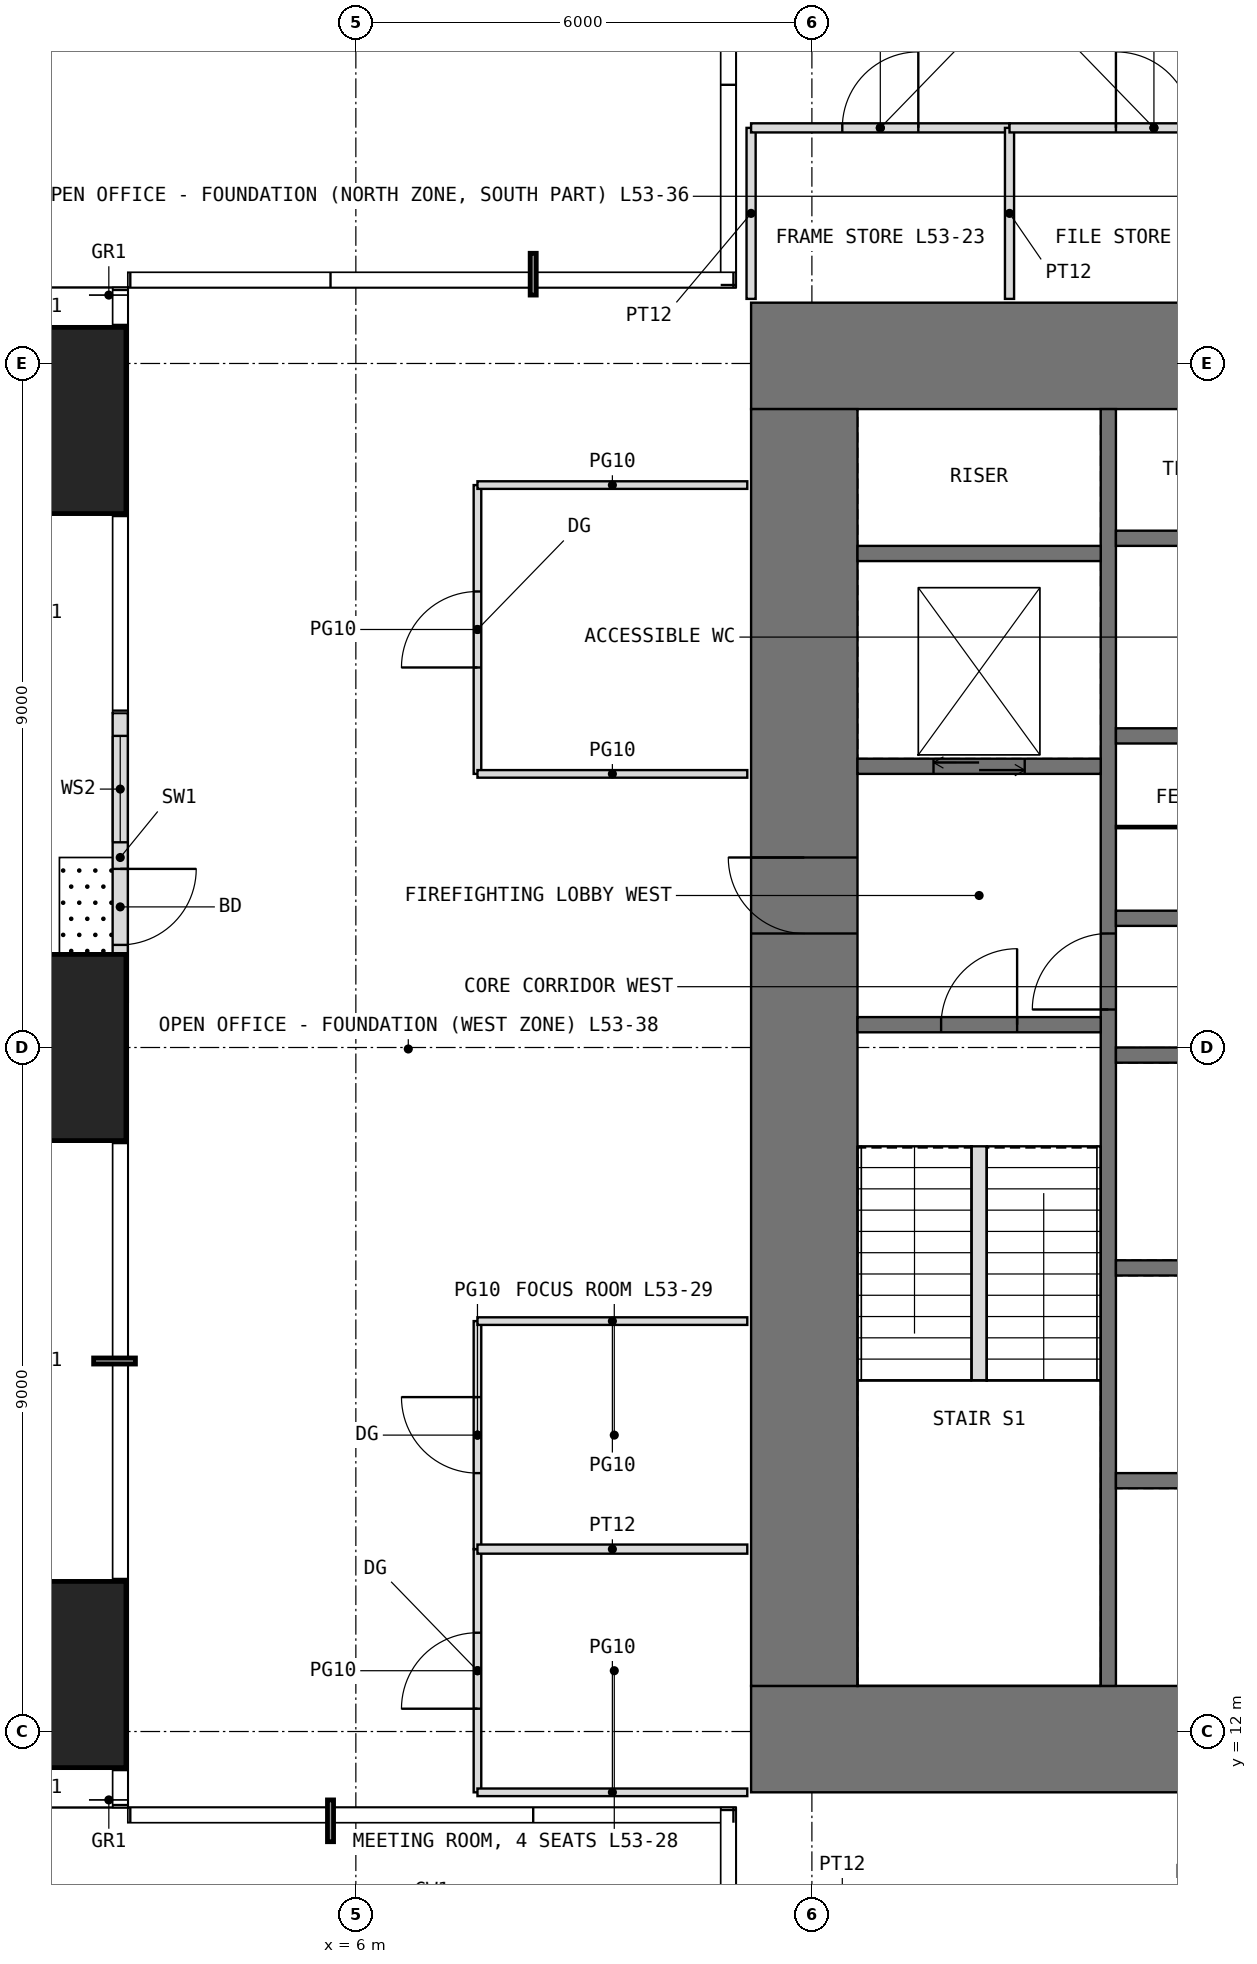
"""IFC4 building model, lengths in metres.
Left out: names, types, materials, properties, quantities, classifications, styles, units other than length and angle.
Written with IfcOpenShell. Run it as: python <this file> out.ifc"""

import sys

from ifc_helpers import new_model, si_unit, direction, frame, frame_2d, origin, origin_2d, place, context, subcontext, project, spatial, rectangle, extrude, element, fill, save


model = new_model("IFC4")
c1 = context("Model", 3, precision=1e-05, world=origin(), true_north=direction((0.0, 1.0)))
c2 = subcontext(c1, "Body", "Model", "MODEL_VIEW")
j1 = project(units=[si_unit("LENGTHUNIT", "METRE"), si_unit("PLANEANGLEUNIT", "RADIAN")], contexts=[c1])
p1 = place(None, origin())
s1 = spatial("IfcSite", under=j1, at=p1, CompositionType="ELEMENT")
p2 = place(p1, origin())
s2 = spatial("IfcBuilding", under=s1, at=p2, CompositionType="ELEMENT")
p3 = place(p2, frame((0.0, 0.0, 222.5)))
s3 = spatial("IfcBuildingStorey", under=s2, at=p3, CompositionType="ELEMENT", Elevation=222.5)
for number, where, z_axis, x_axis in (
    (1, (1.75, 12.75, 0.0), (0.0, 0.0, 1.0), (1.0, 0.0, 0.0)),
    (2, (1.75, 21.0, 0.0), (0.0, 0.0, 1.0), (1.0, 0.0, 0.0)),
    (3, (1.75, 29.25, 0.0), (0.0, 0.0, 1.0), (1.0, 0.0, 0.0)),
):
    element("IfcColumn", number, at=place(p3, frame(where, z_axis=z_axis, x_axis=x_axis)), inside=s3, PredefinedType="COLUMN", context=c2, shape_type="SweptSolid", body=[
        extrude(rectangle(XDim=2.45, YDim=2.45, at=origin_2d()), origin(), (0.0, 0.0, 1.0), 4.0),
    ])
p4 = place(p3, frame((2.9, 25.4, 0.0), z_axis=(0.0, 0.0, 1.0), x_axis=(0.0, -1.0, 0.0)))
e4 = element("IfcWall", 4, at=p4, inside=s3, PredefinedType="USERDEFINED", context=c2, shape_type="SweptSolid", body=[
    extrude(rectangle(XDim=3.8, YDim=0.2, at=frame_2d((1.9, 0.0))), origin(), (0.0, 0.0, 1.0), 3.75),
])
p5 = place(p4, frame((2.05, 0.0, 0.0)))
e5 = element("IfcOpeningElement", 5, at=p5, cuts=e4, PredefinedType="OPENING", context=c2, shape_type="SweptSolid", body=[
    extrude(rectangle(XDim=1.0, YDim=2.4, at=frame_2d((0.5, 1.2))), frame((0.0, 0.11, 0.0), z_axis=(0.0, -1.0, 0.0), x_axis=(1.0, 0.0, 0.0)), (0.0, 0.0, 1.0), 0.22),
])
p6 = place(p4, frame((0.3, 0.0, 0.3)))
e6 = element("IfcOpeningElement", 6, at=p6, cuts=e4, PredefinedType="OPENING", context=c2, shape_type="SweptSolid", body=[
    extrude(rectangle(XDim=1.4, YDim=2.7, at=frame_2d((0.7, 1.35))), frame((0.0, 0.11, 0.0), z_axis=(0.0, -1.0, 0.0), x_axis=(1.0, 0.0, 0.0)), (0.0, 0.0, 1.0), 0.22),
])
p7 = place(p3, frame((11.2, 11.9, -0.05), z_axis=(0.0, 0.0, 1.0), x_axis=(1.0, 0.0, 0.0)))
e7 = element("IfcWall", 7, at=p7, inside=s3, PredefinedType="SHEAR", context=c2, shape_type="SweptSolid", body=[
    extrude(rectangle(XDim=19.6, YDim=1.4, at=frame_2d((9.8, 0.0))), origin(), (0.0, 0.0, 1.0), 4.0),
])
p8 = place(p7, frame((8.8, 0.0, 0.05)))
e8 = element("IfcOpeningElement", 8, at=p8, cuts=e7, PredefinedType="OPENING", context=c2, shape_type="SweptSolid", body=[
    extrude(rectangle(XDim=2.0, YDim=2.2, at=frame_2d((1.0, 1.1))), frame((0.0, 0.71, 0.0), z_axis=(0.0, -1.0, 0.0), x_axis=(1.0, 0.0, 0.0)), (0.0, 0.0, 1.0), 1.42),
])
p9 = place(p3, frame((11.2, 30.1, -0.05), z_axis=(0.0, 0.0, 1.0), x_axis=(1.0, 0.0, 0.0)))
e9 = element("IfcWall", 9, at=p9, inside=s3, PredefinedType="SHEAR", context=c2, shape_type="SweptSolid", body=[
    extrude(rectangle(XDim=19.6, YDim=1.4, at=frame_2d((9.8, 0.0))), origin(), (0.0, 0.0, 1.0), 4.0),
])
p10 = place(p9, frame((8.8, 0.0, 0.05)))
e10 = element("IfcOpeningElement", 10, at=p10, cuts=e9, PredefinedType="OPENING", context=c2, shape_type="SweptSolid", body=[
    extrude(rectangle(XDim=2.0, YDim=2.2, at=frame_2d((1.0, 1.1))), frame((0.0, 0.71, 0.0), z_axis=(0.0, -1.0, 0.0), x_axis=(1.0, 0.0, 0.0)), (0.0, 0.0, 1.0), 1.42),
])
p11 = place(p3, frame((11.9, 12.6, -0.05), z_axis=(0.0, 0.0, 1.0), x_axis=(0.0, 1.0, 0.0)))
e11 = element("IfcWall", 11, at=p11, inside=s3, PredefinedType="SHEAR", context=c2, shape_type="SweptSolid", body=[
    extrude(rectangle(XDim=16.8, YDim=1.4, at=frame_2d((8.4, 0.0))), origin(), (0.0, 0.0, 1.0), 4.0),
])
p12 = place(p11, frame((9.9, 0.0, 0.05)))
e12 = element("IfcOpeningElement", 12, at=p12, cuts=e11, PredefinedType="OPENING", context=c2, shape_type="SweptSolid", body=[
    extrude(rectangle(XDim=1.0, YDim=2.2, at=frame_2d((0.5, 1.1))), frame((0.0, 0.71, 0.0), z_axis=(0.0, -1.0, 0.0), x_axis=(1.0, 0.0, 0.0)), (0.0, 0.0, 1.0), 1.42),
])
p13 = place(p3, frame((15.9, 12.6, -0.05), z_axis=(0.0, 0.0, 1.0), x_axis=(0.0, 1.0, 0.0)))
e13 = element("IfcWall", 13, at=p13, inside=s3, PredefinedType="SHEAR", context=c2, shape_type="SweptSolid", body=[
    extrude(rectangle(XDim=16.8, YDim=0.2, at=frame_2d((8.4, 0.0))), origin(), (0.0, 0.0, 1.0), 4.0),
])
p14 = place(p13, frame((8.9, 0.0, 0.05)))
e14 = element("IfcOpeningElement", 14, at=p14, cuts=e13, PredefinedType="OPENING", context=c2, shape_type="SweptSolid", body=[
    extrude(rectangle(XDim=1.0, YDim=2.2, at=frame_2d((0.5, 1.1))), frame((0.0, 0.11, 0.0), z_axis=(0.0, -1.0, 0.0), x_axis=(1.0, 0.0, 0.0)), (0.0, 0.0, 1.0), 0.22),
])
p15 = place(p3, frame((12.6, 21.3, -0.05), z_axis=(0.0, 0.0, 1.0), x_axis=(1.0, 0.0, 0.0)))
e15 = element("IfcWall", 15, at=p15, inside=s3, PredefinedType="SHEAR", context=c2, shape_type="SweptSolid", body=[
    extrude(rectangle(XDim=3.2, YDim=0.2, at=frame_2d((1.6, 0.0))), origin(), (0.0, 0.0, 1.0), 4.0),
])
p16 = place(p15, frame((1.1, 0.0, 0.05)))
e16 = element("IfcOpeningElement", 16, at=p16, cuts=e15, PredefinedType="OPENING", context=c2, shape_type="SweptSolid", body=[
    extrude(rectangle(XDim=1.0, YDim=2.2, at=frame_2d((0.5, 1.1))), frame((0.0, 0.11, 0.0), z_axis=(0.0, -1.0, 0.0), x_axis=(1.0, 0.0, 0.0)), (0.0, 0.0, 1.0), 0.22),
])
p17 = place(p3, frame((12.6, 24.7, -0.05), z_axis=(0.0, 0.0, 1.0), x_axis=(1.0, 0.0, 0.0)))
e17 = element("IfcWall", 17, at=p17, inside=s3, PredefinedType="SHEAR", context=c2, shape_type="SweptSolid", body=[
    extrude(rectangle(XDim=3.2, YDim=0.2, at=frame_2d((1.6, 0.0))), origin(), (0.0, 0.0, 1.0), 4.0),
])
p18 = place(p17, frame((1.0, 0.0, 0.05)))
e18 = element("IfcOpeningElement", 18, at=p18, cuts=e17, PredefinedType="OPENING", context=c2, shape_type="SweptSolid", body=[
    extrude(rectangle(XDim=1.2, YDim=2.2, at=frame_2d((0.6, 1.1))), frame((0.0, 0.11, 0.0), z_axis=(0.0, -1.0, 0.0), x_axis=(1.0, 0.0, 0.0)), (0.0, 0.0, 1.0), 0.22),
])
for number, where, z_axis, x_axis in (
    (19, (12.6, 27.5, -0.05), (0.0, 0.0, 1.0), (1.0, 0.0, 0.0)),
    (20, (16.0, 15.3, -0.05), (0.0, 0.0, 1.0), (1.0, 0.0, 0.0)),
    (21, (16.0, 18.1, -0.05), (0.0, 0.0, 1.0), (1.0, 0.0, 0.0)),
    (22, (16.0, 20.9, -0.05), (0.0, 0.0, 1.0), (1.0, 0.0, 0.0)),
    (23, (16.0, 22.7, -0.05), (0.0, 0.0, 1.0), (1.0, 0.0, 0.0)),
    (24, (16.0, 25.1, -0.05), (0.0, 0.0, 1.0), (1.0, 0.0, 0.0)),
    (25, (16.0, 27.7, -0.05), (0.0, 0.0, 1.0), (1.0, 0.0, 0.0)),
):
    element("IfcWall", number, at=place(p3, frame(where, z_axis=z_axis, x_axis=x_axis)), inside=s3, PredefinedType="SHEAR", context=c2, shape_type="SweptSolid", body=[
        extrude(rectangle(XDim=3.2, YDim=0.2, at=frame_2d((1.6, 0.0))), origin(), (0.0, 0.0, 1.0), 4.0),
    ])
p19 = place(p3, frame((16.0, 23.9, 0.0), z_axis=(0.0, 0.0, 1.0), x_axis=(1.0, 0.0, 0.0)))
e26 = element("IfcWall", 26, at=p19, inside=s3, PredefinedType="PARTITIONING", context=c2, shape_type="SweptSolid", body=[
    extrude(rectangle(XDim=1.4, YDim=0.03, at=frame_2d((0.7, 0.0))), origin(), (0.0, 0.0, 1.0), 3.75),
])
p20 = place(p3, frame((7.6, 11.2, 0.0), z_axis=(0.0, 0.0, 1.0), x_axis=(0.0, 1.0, 0.0)))
e27 = element("IfcWall", 27, at=p20, inside=s3, PredefinedType="PARTITIONING", context=c2, shape_type="SweptSolid", body=[
    extrude(rectangle(XDim=3.2, YDim=0.1, at=frame_2d((1.6, 0.0))), origin(), (0.0, 0.0, 1.0), 3.75),
])
p21 = place(p20, frame((1.1, 0.0, 0.0)))
e28 = element("IfcOpeningElement", 28, at=p21, cuts=e27, PredefinedType="OPENING", context=c2, shape_type="SweptSolid", body=[
    extrude(rectangle(XDim=1.0, YDim=2.4, at=frame_2d((0.5, 1.2))), frame((0.0, 0.06, 0.0), z_axis=(0.0, -1.0, 0.0), x_axis=(1.0, 0.0, 0.0)), (0.0, 0.0, 1.0), 0.12),
])
p22 = place(p3, frame((7.6, 11.2, 0.0), z_axis=(0.0, 0.0, 1.0), x_axis=(1.0, 0.0, 0.0)))
e29 = element("IfcWall", 29, at=p22, inside=s3, PredefinedType="PARTITIONING", context=c2, shape_type="SweptSolid", body=[
    extrude(rectangle(XDim=3.55, YDim=0.1, at=frame_2d((1.775, 0.0))), origin(), (0.0, 0.0, 1.0), 3.75),
])
p23 = place(p3, frame((7.6, 14.4, 0.0), z_axis=(0.0, 0.0, 1.0), x_axis=(0.0, 1.0, 0.0)))
e30 = element("IfcWall", 30, at=p23, inside=s3, PredefinedType="PARTITIONING", context=c2, shape_type="SweptSolid", body=[
    extrude(rectangle(XDim=3.0, YDim=0.1, at=frame_2d((1.5, 0.0))), origin(), (0.0, 0.0, 1.0), 3.75),
])
p24 = place(p23, frame((1.0, 0.0, 0.0)))
e31 = element("IfcOpeningElement", 31, at=p24, cuts=e30, PredefinedType="OPENING", context=c2, shape_type="SweptSolid", body=[
    extrude(rectangle(XDim=1.0, YDim=2.4, at=frame_2d((0.5, 1.2))), frame((0.0, 0.06, 0.0), z_axis=(0.0, -1.0, 0.0), x_axis=(1.0, 0.0, 0.0)), (0.0, 0.0, 1.0), 0.12),
])
p25 = place(p3, frame((7.6, 14.4, 0.0), z_axis=(0.0, 0.0, 1.0), x_axis=(1.0, 0.0, 0.0)))
e32 = element("IfcWall", 32, at=p25, inside=s3, PredefinedType="PARTITIONING", context=c2, shape_type="SweptSolid", body=[
    extrude(rectangle(XDim=3.55, YDim=0.12, at=frame_2d((1.775, 0.0))), origin(), (0.0, 0.0, 1.0), 3.75),
])
p26 = place(p3, frame((7.6, 17.4, 0.0), z_axis=(0.0, 0.0, 1.0), x_axis=(1.0, 0.0, 0.0)))
e33 = element("IfcWall", 33, at=p26, inside=s3, PredefinedType="PARTITIONING", context=c2, shape_type="SweptSolid", body=[
    extrude(rectangle(XDim=3.55, YDim=0.1, at=frame_2d((1.775, 0.0))), origin(), (0.0, 0.0, 1.0), 3.75),
])
p27 = place(p3, frame((7.6, 24.6, 0.0), z_axis=(0.0, 0.0, 1.0), x_axis=(0.0, 1.0, 0.0)))
e34 = element("IfcWall", 34, at=p27, inside=s3, PredefinedType="PARTITIONING", context=c2, shape_type="SweptSolid", body=[
    extrude(rectangle(XDim=3.8, YDim=0.1, at=frame_2d((1.9, 0.0))), origin(), (0.0, 0.0, 1.0), 3.75),
])
p28 = place(p27, frame((1.4, 0.0, 0.0)))
e35 = element("IfcOpeningElement", 35, at=p28, cuts=e34, PredefinedType="OPENING", context=c2, shape_type="SweptSolid", body=[
    extrude(rectangle(XDim=1.0, YDim=2.4, at=frame_2d((0.5, 1.2))), frame((0.0, 0.06, 0.0), z_axis=(0.0, -1.0, 0.0), x_axis=(1.0, 0.0, 0.0)), (0.0, 0.0, 1.0), 0.12),
])
for number, where, z_axis, x_axis in (
    (36, (7.6, 24.6, 0.0), (0.0, 0.0, 1.0), (1.0, 0.0, 0.0)),
    (37, (7.6, 28.4, 0.0), (0.0, 0.0, 1.0), (1.0, 0.0, 0.0)),
):
    element("IfcWall", number, at=place(p3, frame(where, z_axis=z_axis, x_axis=x_axis)), inside=s3, PredefinedType="PARTITIONING", context=c2, shape_type="SweptSolid", body=[
        extrude(rectangle(XDim=3.55, YDim=0.1, at=frame_2d((1.775, 0.0))), origin(), (0.0, 0.0, 1.0), 3.75),
    ])
p29 = place(p3, frame((11.2, 30.85, 0.0), z_axis=(0.0, 0.0, 1.0), x_axis=(0.0, 1.0, 0.0)))
e38 = element("IfcWall", 38, at=p29, inside=s3, PredefinedType="PARTITIONING", context=c2, shape_type="SweptSolid", body=[
    extrude(rectangle(XDim=2.25, YDim=0.12, at=frame_2d((1.125, 0.0))), origin(), (0.0, 0.0, 1.0), 3.75),
])
p30 = place(p3, frame((11.2, 33.1, 0.0), z_axis=(0.0, 0.0, 1.0), x_axis=(1.0, 0.0, 0.0)))
e39 = element("IfcWall", 39, at=p30, inside=s3, PredefinedType="PARTITIONING", context=c2, shape_type="SweptSolid", body=[
    extrude(rectangle(XDim=3.4, YDim=0.12, at=frame_2d((1.7, 0.0))), origin(), (0.0, 0.0, 1.0), 3.75),
])
p31 = place(p30, frame((1.2, 0.0, 0.0)))
e40 = element("IfcOpeningElement", 40, at=p31, cuts=e39, PredefinedType="OPENING", context=c2, shape_type="SweptSolid", body=[
    extrude(rectangle(XDim=1.0, YDim=2.2, at=frame_2d((0.5, 1.1))), frame((0.0, 0.07, 0.0), z_axis=(0.0, -1.0, 0.0), x_axis=(1.0, 0.0, 0.0)), (0.0, 0.0, 1.0), 0.14),
])
p32 = place(p3, frame((14.6, 30.85, 0.0), z_axis=(0.0, 0.0, 1.0), x_axis=(0.0, 1.0, 0.0)))
e41 = element("IfcWall", 41, at=p32, inside=s3, PredefinedType="PARTITIONING", context=c2, shape_type="SweptSolid", body=[
    extrude(rectangle(XDim=2.25, YDim=0.12, at=frame_2d((1.125, 0.0))), origin(), (0.0, 0.0, 1.0), 3.75),
])
p33 = place(p3, frame((14.6, 33.1, 0.0), z_axis=(0.0, 0.0, 1.0), x_axis=(1.0, 0.0, 0.0)))
e42 = element("IfcWall", 42, at=p33, inside=s3, PredefinedType="PARTITIONING", context=c2, shape_type="SweptSolid", body=[
    extrude(rectangle(XDim=3.8, YDim=0.12, at=frame_2d((1.9, 0.0))), origin(), (0.0, 0.0, 1.0), 3.75),
])
p34 = place(p33, frame((1.4, 0.0, 0.0)))
e43 = element("IfcOpeningElement", 43, at=p34, cuts=e42, PredefinedType="OPENING", context=c2, shape_type="SweptSolid", body=[
    extrude(rectangle(XDim=1.0, YDim=2.2, at=frame_2d((0.5, 1.1))), frame((0.0, 0.07, 0.0), z_axis=(0.0, -1.0, 0.0), x_axis=(1.0, 0.0, 0.0)), (0.0, 0.0, 1.0), 0.14),
])
p35 = place(p3, frame((14.2, 16.62, 0.0), z_axis=(0.0, 0.0, 1.0), x_axis=(0.0, 1.0, 0.0)))
e44 = element("IfcWall", 44, at=p35, inside=s3, PredefinedType="PARTITIONING", context=c2, shape_type="SweptSolid", body=[
    extrude(rectangle(XDim=3.08, YDim=0.2, at=frame_2d((1.54, 0.0))), origin(), (0.0, 0.0, 1.0), 4.0),
])
p36 = place(p5, origin())
e45 = element("IfcDoor", 45, at=p36, inside=s3, OperationType="SINGLE_SWING_LEFT", PredefinedType="DOOR", context=c2, shape_type="SweptSolid", body=[
    extrude(rectangle(XDim=1.0, YDim=2.4, at=frame_2d((0.5, 1.2))), frame((0.0, 0.025, 0.0), z_axis=(0.0, -1.0, 0.0), x_axis=(1.0, 0.0, 0.0)), (0.0, 0.0, 1.0), 0.05),
])
fill(e5, e45)
p37 = place(p6, origin())
e46 = element("IfcWindow", 46, at=p37, inside=s3, PartitioningType="SINGLE_PANEL", PredefinedType="WINDOW", context=c2, shape_type="SweptSolid", body=[
    extrude(rectangle(XDim=1.4, YDim=2.7, at=frame_2d((0.7, 1.35))), frame((0.0, 0.03, 0.0), z_axis=(0.0, -1.0, 0.0), x_axis=(1.0, 0.0, 0.0)), (0.0, 0.0, 1.0), 0.06),
])
fill(e6, e46)
p38 = place(p12, origin())
e47 = element("IfcDoor", 47, at=p38, inside=s3, OperationType="SINGLE_SWING_RIGHT", PredefinedType="DOOR", context=c2, shape_type="SweptSolid", body=[
    extrude(rectangle(XDim=1.0, YDim=2.2, at=frame_2d((0.5, 1.1))), frame((0.0, 0.025, 0.0), z_axis=(0.0, -1.0, 0.0), x_axis=(1.0, 0.0, 0.0)), (0.0, 0.0, 1.0), 0.05),
])
fill(e12, e47)
p39 = place(p16, origin())
e48 = element("IfcDoor", 48, at=p39, inside=s3, OperationType="SINGLE_SWING_RIGHT", PredefinedType="DOOR", context=c2, shape_type="SweptSolid", body=[
    extrude(rectangle(XDim=1.0, YDim=2.2, at=frame_2d((0.5, 1.1))), frame((0.0, 0.025, 0.0), z_axis=(0.0, -1.0, 0.0), x_axis=(1.0, 0.0, 0.0)), (0.0, 0.0, 1.0), 0.05),
])
fill(e16, e48)
p40 = place(p14, origin())
e49 = element("IfcDoor", 49, at=p40, inside=s3, OperationType="SINGLE_SWING_LEFT", PredefinedType="DOOR", context=c2, shape_type="SweptSolid", body=[
    extrude(rectangle(XDim=1.0, YDim=2.2, at=frame_2d((0.5, 1.1))), frame((0.0, 0.025, 0.0), z_axis=(0.0, -1.0, 0.0), x_axis=(1.0, 0.0, 0.0)), (0.0, 0.0, 1.0), 0.05),
])
fill(e14, e49)
p41 = place(p31, origin())
e50 = element("IfcDoor", 50, at=p41, inside=s3, OperationType="SINGLE_SWING_RIGHT", PredefinedType="DOOR", context=c2, shape_type="SweptSolid", body=[
    extrude(rectangle(XDim=1.0, YDim=2.2, at=frame_2d((0.5, 1.1))), frame((0.0, 0.025, 0.0), z_axis=(0.0, -1.0, 0.0), x_axis=(1.0, 0.0, 0.0)), (0.0, 0.0, 1.0), 0.05),
])
fill(e40, e50)
p42 = place(p34, origin())
e51 = element("IfcDoor", 51, at=p42, inside=s3, OperationType="SINGLE_SWING_LEFT", PredefinedType="DOOR", context=c2, shape_type="SweptSolid", body=[
    extrude(rectangle(XDim=1.0, YDim=2.2, at=frame_2d((0.5, 1.1))), frame((0.0, 0.025, 0.0), z_axis=(0.0, -1.0, 0.0), x_axis=(1.0, 0.0, 0.0)), (0.0, 0.0, 1.0), 0.05),
])
fill(e43, e51)
p43 = place(p21, origin())
e52 = element("IfcDoor", 52, at=p43, inside=s3, OperationType="SINGLE_SWING_LEFT", PredefinedType="DOOR", context=c2, shape_type="SweptSolid", body=[
    extrude(rectangle(XDim=1.0, YDim=2.4, at=frame_2d((0.5, 1.2))), frame((0.0, 0.025, 0.0), z_axis=(0.0, -1.0, 0.0), x_axis=(1.0, 0.0, 0.0)), (0.0, 0.0, 1.0), 0.05),
])
fill(e28, e52)
p44 = place(p24, origin())
e53 = element("IfcDoor", 53, at=p44, inside=s3, OperationType="SINGLE_SWING_RIGHT", PredefinedType="DOOR", context=c2, shape_type="SweptSolid", body=[
    extrude(rectangle(XDim=1.0, YDim=2.4, at=frame_2d((0.5, 1.2))), frame((0.0, 0.025, 0.0), z_axis=(0.0, -1.0, 0.0), x_axis=(1.0, 0.0, 0.0)), (0.0, 0.0, 1.0), 0.05),
])
fill(e31, e53)
p45 = place(p28, origin())
e54 = element("IfcDoor", 54, at=p45, inside=s3, OperationType="SINGLE_SWING_LEFT", PredefinedType="DOOR", context=c2, shape_type="SweptSolid", body=[
    extrude(rectangle(XDim=1.0, YDim=2.4, at=frame_2d((0.5, 1.2))), frame((0.0, 0.025, 0.0), z_axis=(0.0, -1.0, 0.0), x_axis=(1.0, 0.0, 0.0)), (0.0, 0.0, 1.0), 0.05),
])
fill(e35, e54)
p46 = place(p18, origin())
e55 = element("IfcDoor", 55, at=p46, inside=s3, OperationType="DOUBLE_DOOR_SLIDING", PredefinedType="DOOR", context=c2, shape_type="SweptSolid", body=[
    extrude(rectangle(XDim=1.2, YDim=2.2, at=frame_2d((0.6, 1.1))), frame((0.0, 0.025, 0.0), z_axis=(0.0, -1.0, 0.0), x_axis=(1.0, 0.0, 0.0)), (0.0, 0.0, 1.0), 0.05),
])
fill(e18, e55)
save(model, sys.argv[1])
